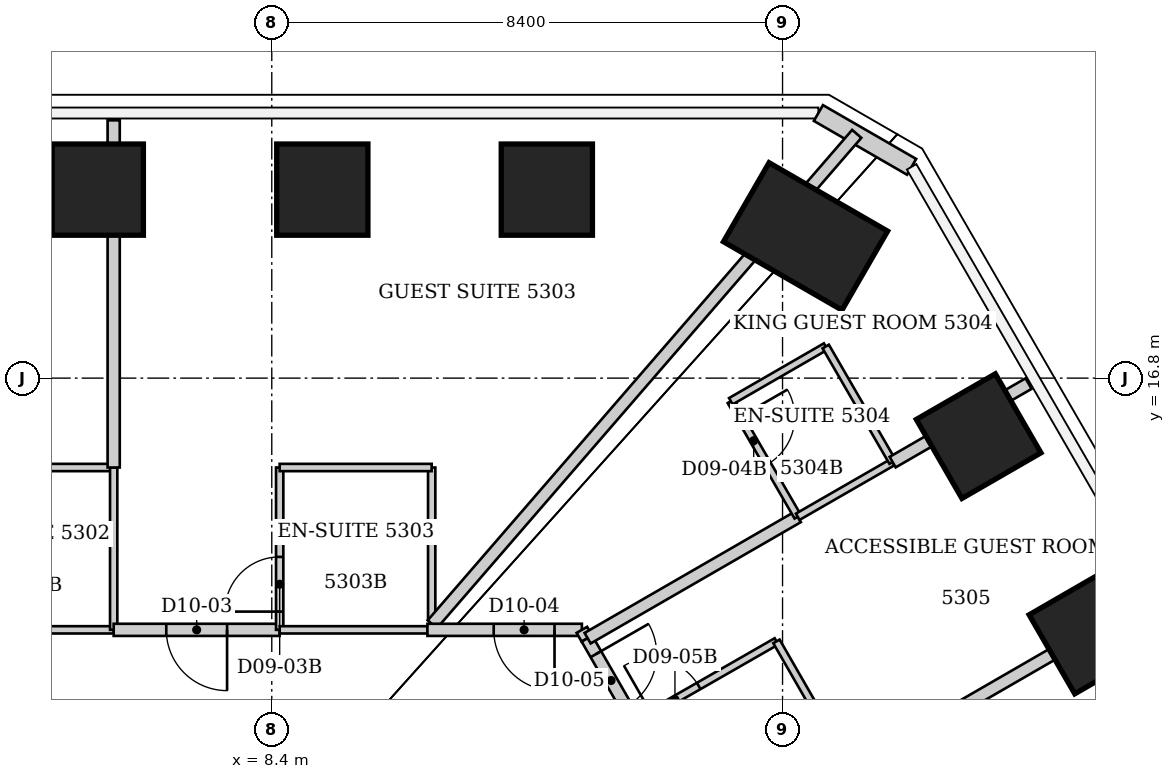
"""IFC4 building model, lengths in metres.
Left out: names, types, materials, properties, quantities, classifications, styles, units other than length and angle.
Written with IfcOpenShell. Run it as: python <this file> out.ifc"""

import sys

from ifc_helpers import new_model, si_unit, direction, frame, frame_2d, origin, origin_2d, place, context, subcontext, project, spatial, rectangle, extrude, element, fill, save


model = new_model("IFC4")
c1 = context("Model", 3, precision=1e-05, world=origin(), true_north=direction((0.0, 1.0)))
c2 = subcontext(c1, "Body", "Model", "MODEL_VIEW")
j1 = project(units=[si_unit("LENGTHUNIT", "METRE"), si_unit("PLANEANGLEUNIT", "RADIAN")], contexts=[c1])
p1 = place(None, origin())
s1 = spatial("IfcSite", under=j1, at=p1, CompositionType="ELEMENT")
p2 = place(p1, origin())
s2 = spatial("IfcBuilding", under=s1, at=p2, CompositionType="ELEMENT")
p3 = place(p2, frame((0.0, 0.0, 213.6)))
s3 = spatial("IfcBuildingStorey", under=s2, at=p3, CompositionType="ELEMENT", Elevation=213.6)
for number, where, z_axis, x_axis in (
    (1, (5.539, 19.9, 0.0), (0.0, 0.0, 1.0), (0.0, 1.0, 0.0)),
    (2, (9.231, 19.9, 0.0), (0.0, 0.0, 1.0), (0.0, 1.0, 0.0)),
    (3, (12.924, 19.9, 0.0), (0.0, 0.0, 1.0), (0.0, 1.0, 0.0)),
):
    element("IfcColumn", number, at=place(p3, frame(where, z_axis=z_axis, x_axis=x_axis)), inside=s3, PredefinedType="COLUMN", context=c2, shape_type="SweptSolid", body=[
        extrude(rectangle(XDim=1.5, YDim=1.5, at=origin_2d()), origin(), (0.0, 0.0, 1.0), 3.8),
    ])
p4 = place(p3, frame((17.178, 19.131, 0.0), z_axis=(0.0, 0.0, 1.0), x_axis=(0.5, 0.866025403784, 0.0)))
e4 = element("IfcColumn", 4, at=p4, inside=s3, PredefinedType="COLUMN", context=c2, shape_type="SweptSolid", body=[
    extrude(rectangle(XDim=1.5, YDim=2.25, at=origin_2d()), origin(), (0.0, 0.0, 1.0), 3.8),
])
for number, where, z_axis, x_axis in (
    (5, (20.025, 15.846, 0.0), (0.0, 0.0, 1.0), (0.866, 0.5, 0.0)),
    (6, (21.88, 12.633, 0.0), (0.0, 0.0, 1.0), (0.866, 0.5, 0.0)),
):
    element("IfcColumn", number, at=place(p3, frame(where, z_axis=z_axis, x_axis=x_axis)), inside=s3, PredefinedType="COLUMN", context=c2, shape_type="SweptSolid", body=[
        extrude(rectangle(XDim=1.5, YDim=1.5, at=origin_2d()), origin(), (0.0, 0.0, 1.0), 3.8),
    ])
p5 = place(p3, frame((17.39, 21.16, 0.0), z_axis=(0.0, 0.0, 1.0), x_axis=(0.866036293601, -0.499981137809, 0.0)))
e7 = element("IfcWall", 7, at=p5, inside=s3, PredefinedType="SOLIDWALL", context=c2, shape_type="SweptSolid", body=[
    extrude(rectangle(XDim=1.77, YDim=0.3, at=frame_2d((0.885, 0.0))), origin(), (0.0, 0.0, 1.0), 3.64),
])
for number, where, z_axis, x_axis in (
    (8, (5.8, 12.66, 0.0), (0.0, 0.0, 1.0), (-1.0, 0.0, 0.0)),
    (9, (5.8, 15.33, 0.0), (0.0, 0.0, 1.0), (-1.0, 0.0, 0.0)),
):
    element("IfcWall", number, at=place(p3, frame(where, z_axis=z_axis, x_axis=x_axis)), inside=s3, PredefinedType="PARTITIONING", context=c2, shape_type="SweptSolid", body=[
        extrude(rectangle(XDim=2.45, YDim=0.12, at=frame_2d((1.225, 0.0))), origin(), (0.0, 0.0, 1.0), 3.64),
    ])
p6 = place(p3, frame((5.8, 15.33, 0.0), z_axis=(0.0, 0.0, 1.0), x_axis=(0.0, -1.0, 0.0)))
e10 = element("IfcWall", 10, at=p6, inside=s3, PredefinedType="PARTITIONING", context=c2, shape_type="SweptSolid", body=[
    extrude(rectangle(XDim=2.67, YDim=0.12, at=frame_2d((1.335, 0.0))), origin(), (0.0, 0.0, 1.0), 3.64),
])
p7 = place(p3, frame((5.8, 21.04, 0.0), z_axis=(0.0, 0.0, 1.0), x_axis=(0.0, -1.0, 0.0)))
e11 = element("IfcWall", 11, at=p7, inside=s3, PredefinedType="PARTITIONING", context=c2, shape_type="SweptSolid", body=[
    extrude(rectangle(XDim=5.71, YDim=0.2, at=frame_2d((2.855, 0.0))), origin(), (0.0, 0.0, 1.0), 3.64),
])
p8 = place(p3, frame((8.53, 12.66, 0.0), z_axis=(0.0, 0.0, 1.0), x_axis=(-1.0, 0.0, 0.0)))
e12 = element("IfcWall", 12, at=p8, inside=s3, PredefinedType="PARTITIONING", context=c2, shape_type="SweptSolid", body=[
    extrude(rectangle(XDim=2.73, YDim=0.2, at=frame_2d((1.365, 0.0))), origin(), (0.0, 0.0, 1.0), 3.64),
])
p9 = place(p8, frame((0.865, 0.0, 0.0)))
e13 = element("IfcOpeningElement", 13, at=p9, cuts=e12, PredefinedType="OPENING", context=c2, shape_type="SweptSolid", body=[
    extrude(rectangle(XDim=1.0, YDim=2.13, at=frame_2d((0.5, 1.065))), frame((0.0, 0.1, 0.0), z_axis=(0.0, -1.0, 0.0), x_axis=(1.0, 0.0, 0.0)), (0.0, 0.0, 1.0), 0.2),
])
p10 = place(p3, frame((8.53, 15.33, 0.0), z_axis=(0.0, 0.0, 1.0), x_axis=(0.0, -1.0, 0.0)))
e14 = element("IfcWall", 14, at=p10, inside=s3, PredefinedType="PARTITIONING", context=c2, shape_type="SweptSolid", body=[
    extrude(rectangle(XDim=2.67, YDim=0.12, at=frame_2d((1.335, 0.0))), origin(), (0.0, 0.0, 1.0), 3.64),
])
p11 = place(p10, frame((1.47, 0.0, 0.0)))
e15 = element("IfcOpeningElement", 15, at=p11, cuts=e14, PredefinedType="OPENING", context=c2, shape_type="SweptSolid", body=[
    extrude(rectangle(XDim=0.9, YDim=2.03, at=frame_2d((0.45, 1.015))), frame((0.0, 0.06, 0.0), z_axis=(0.0, -1.0, 0.0), x_axis=(1.0, 0.0, 0.0)), (0.0, 0.0, 1.0), 0.12),
])
p12 = place(p3, frame((10.96, 12.66, 0.0), z_axis=(0.0, 0.0, 1.0), x_axis=(-1.0, 0.0, 0.0)))
e16 = element("IfcWall", 16, at=p12, inside=s3, PredefinedType="PARTITIONING", context=c2, shape_type="SweptSolid", body=[
    extrude(rectangle(XDim=2.43, YDim=0.12, at=frame_2d((1.215, 0.0))), origin(), (0.0, 0.0, 1.0), 3.64),
])
p13 = place(p3, frame((11.03, 12.83, 0.0), z_axis=(0.0, 0.0, 1.0), x_axis=(0.0, 1.0, 0.0)))
e17 = element("IfcWall", 17, at=p13, inside=s3, PredefinedType="PARTITIONING", context=c2, shape_type="SweptSolid", body=[
    extrude(rectangle(XDim=2.5, YDim=0.12, at=frame_2d((1.25, 0.0))), origin(), (0.0, 0.0, 1.0), 3.038),
])
p14 = place(p3, frame((11.03, 15.33, 0.0), z_axis=(0.0, 0.0, 1.0), x_axis=(-1.0, 0.0, 0.0)))
e18 = element("IfcWall", 18, at=p14, inside=s3, PredefinedType="PARTITIONING", context=c2, shape_type="SweptSolid", body=[
    extrude(rectangle(XDim=2.5, YDim=0.12, at=frame_2d((1.25, 0.0))), origin(), (0.0, 0.0, 1.0), 3.64),
])
p15 = place(p3, frame((11.04, 12.751, 0.0), z_axis=(0.0, 0.0, 1.0), x_axis=(0.654384042683, 0.756162366613, 0.0)))
e19 = element("IfcWall", 19, at=p15, inside=s3, PredefinedType="PARTITIONING", context=c2, shape_type="SweptSolid", body=[
    extrude(rectangle(XDim=10.667, YDim=0.2, at=frame_2d((5.333, 0.0))), origin(), (0.0, 0.0, 1.0), 3.64),
])
p16 = place(p3, frame((13.5, 12.66, 0.0), z_axis=(0.0, 0.0, 1.0), x_axis=(-1.0, 0.0, 0.0)))
e20 = element("IfcWall", 20, at=p16, inside=s3, PredefinedType="PARTITIONING", context=c2, shape_type="SweptSolid", body=[
    extrude(rectangle(XDim=2.54, YDim=0.2, at=frame_2d((1.27, 0.0))), origin(), (0.0, 0.0, 1.0), 3.64),
])
p17 = place(p16, frame((0.45, 0.0, 0.0)))
e21 = element("IfcOpeningElement", 21, at=p17, cuts=e20, PredefinedType="OPENING", context=c2, shape_type="SweptSolid", body=[
    extrude(rectangle(XDim=1.0, YDim=2.13, at=frame_2d((0.5, 1.065))), frame((0.0, 0.1, 0.0), z_axis=(0.0, -1.0, 0.0), x_axis=(1.0, 0.0, 0.0)), (0.0, 0.0, 1.0), 0.2),
])
p18 = place(p3, frame((13.5, 12.66, 0.0), z_axis=(0.0, 0.0, 1.0), x_axis=(0.498194987799, -0.867065023013, 0.0)))
e22 = element("IfcWall", 22, at=p18, inside=s3, PredefinedType="PARTITIONING", context=c2, shape_type="SweptSolid", body=[
    extrude(rectangle(XDim=0.166, YDim=0.2, at=frame_2d((0.083, 0.0))), origin(), (0.0, 0.0, 1.0), 3.64),
])
p19 = place(p3, frame((13.583, 12.516, 0.0), z_axis=(0.0, 0.0, 1.0), x_axis=(0.498534585837, -0.866869809559, 0.0)))
e23 = element("IfcWall", 23, at=p19, inside=s3, PredefinedType="PARTITIONING", context=c2, shape_type="SweptSolid", body=[
    extrude(rectangle(XDim=1.59, YDim=0.2, at=frame_2d((0.795, 0.0))), origin(), (0.0, 0.0, 1.0), 3.64),
])
p20 = place(p19, frame((0.295, 0.0, 0.0)))
e24 = element("IfcOpeningElement", 24, at=p20, cuts=e23, PredefinedType="OPENING", context=c2, shape_type="SweptSolid", body=[
    extrude(rectangle(XDim=1.0, YDim=2.13, at=frame_2d((0.5, 1.065))), frame((0.0, 0.1, 0.0), z_axis=(0.0, -1.0, 0.0), x_axis=(1.0, 0.0, 0.0)), (0.0, 0.0, 1.0), 0.2),
])
p21 = place(p3, frame((13.594, 12.522, 0.0), z_axis=(0.0, 0.0, 1.0), x_axis=(0.866085778049, 0.499895414124, 0.0)))
e25 = element("IfcWall", 25, at=p21, inside=s3, PredefinedType="PARTITIONING", context=c2, shape_type="SweptSolid", body=[
    extrude(rectangle(XDim=3.991, YDim=0.2, at=frame_2d((1.996, 0.0))), origin(), (0.0, 0.0, 1.0), 3.64),
])
p22 = place(p3, frame((15.95, 16.42, 0.0), z_axis=(0.0, 0.0, 1.0), x_axis=(0.501088872721, -0.865395829453, 0.0)))
e26 = element("IfcWall", 26, at=p22, inside=s3, PredefinedType="PARTITIONING", context=c2, shape_type="SweptSolid", body=[
    extrude(rectangle(XDim=2.195, YDim=0.12, at=frame_2d((1.098, 0.0))), origin(), (0.0, 0.0, 1.0), 3.64),
])
p23 = place(p22, frame((0.3, 0.0, 0.0)))
e27 = element("IfcOpeningElement", 27, at=p23, cuts=e26, PredefinedType="OPENING", context=c2, shape_type="SweptSolid", body=[
    extrude(rectangle(XDim=0.9, YDim=2.03, at=frame_2d((0.45, 1.015))), frame((0.0, 0.06, 0.0), z_axis=(0.0, -1.0, 0.0), x_axis=(1.0, 0.0, 0.0)), (0.0, 0.0, 1.0), 0.12),
])
p24 = place(p3, frame((16.7, 12.47, 0.0), z_axis=(0.0, 0.0, 1.0), x_axis=(-0.867545659855, -0.497357545501, 0.0)))
e28 = element("IfcWall", 28, at=p24, inside=s3, PredefinedType="PARTITIONING", context=c2, shape_type="SweptSolid", body=[
    extrude(rectangle(XDim=2.674, YDim=0.12, at=frame_2d((1.337, 0.0))), origin(), (0.0, 0.0, 1.0), 3.64),
])
p25 = place(p24, frame((1.474, 0.0, 0.0)))
e29 = element("IfcOpeningElement", 29, at=p25, cuts=e28, PredefinedType="OPENING", context=c2, shape_type="SweptSolid", body=[
    extrude(rectangle(XDim=0.9, YDim=2.03, at=frame_2d((0.45, 1.015))), frame((0.0, 0.06, 0.0), z_axis=(0.0, -1.0, 0.0), x_axis=(1.0, 0.0, 0.0)), (0.0, 0.0, 1.0), 0.12),
])
for number, where, z_axis, x_axis in (
    (30, (17.05, 14.52, 0.0), (0.0, 0.0, 1.0), (0.867, 0.499, 0.0)),
    (31, (17.51, 17.32, 0.0), (0.0, 0.0, 1.0), (-0.866, -0.5, 0.0)),
):
    element("IfcWall", number, at=place(p3, frame(where, z_axis=z_axis, x_axis=x_axis)), inside=s3, PredefinedType="PARTITIONING", context=c2, shape_type="SweptSolid", body=[
        extrude(rectangle(XDim=1.801, YDim=0.12, at=frame_2d((0.9, 0.0))), origin(), (0.0, 0.0, 1.0), 3.64),
    ])
p26 = place(p3, frame((17.92, 10.35, 0.0), z_axis=(0.0, 0.0, 1.0), x_axis=(-0.498791783817, 0.866721844883, 0.0)))
e32 = element("IfcWall", 32, at=p26, inside=s3, PredefinedType="PARTITIONING", context=c2, shape_type="SweptSolid", body=[
    extrude(rectangle(XDim=2.446, YDim=0.12, at=frame_2d((1.223, 0.0))), origin(), (0.0, 0.0, 1.0), 3.64),
])
p27 = place(p3, frame((17.923, 10.345, 0.0), z_axis=(0.0, 0.0, 1.0), x_axis=(0.865991848905, 0.500058114253, 0.0)))
e33 = element("IfcWall", 33, at=p27, inside=s3, PredefinedType="PARTITIONING", context=c2, shape_type="SweptSolid", body=[
    extrude(rectangle(XDim=5.708, YDim=0.2, at=frame_2d((2.854, 0.0))), origin(), (0.0, 0.0, 1.0), 2.878),
])
p28 = place(p3, frame((18.61, 15.42, 0.0), z_axis=(0.0, 0.0, 1.0), x_axis=(-0.501040653706, 0.865423747845, 0.0)))
e34 = element("IfcWall", 34, at=p28, inside=s3, PredefinedType="PARTITIONING", context=c2, shape_type="SweptSolid", body=[
    extrude(rectangle(XDim=2.196, YDim=0.12, at=frame_2d((1.098, 0.0))), origin(), (0.0, 0.0, 1.0), 3.64),
])
p29 = place(p3, frame((18.611, 15.418, 0.0), z_axis=(0.0, 0.0, 1.0), x_axis=(0.865870535136, 0.500268144481, 0.0)))
e35 = element("IfcWall", 35, at=p29, inside=s3, PredefinedType="PARTITIONING", context=c2, shape_type="SweptSolid", body=[
    extrude(rectangle(XDim=2.582, YDim=0.2, at=frame_2d((1.291, 0.0))), origin(), (0.0, 0.0, 1.0), 3.64),
])
p30 = place(p9, origin())
e36 = element("IfcDoor", 36, at=p30, inside=s3, OperationType="SINGLE_SWING_LEFT", PredefinedType="DOOR", context=c2, shape_type="SweptSolid", body=[
    extrude(rectangle(XDim=1.0, YDim=2.13, at=frame_2d((0.5, 1.065))), frame((0.0, 0.025, 0.0), z_axis=(0.0, -1.0, 0.0), x_axis=(1.0, 0.0, 0.0)), (0.0, 0.0, 1.0), 0.05),
])
fill(e13, e36)
p31 = place(p11, origin())
e37 = element("IfcDoor", 37, at=p31, inside=s3, OperationType="SINGLE_SWING_RIGHT", PredefinedType="DOOR", context=c2, shape_type="SweptSolid", body=[
    extrude(rectangle(XDim=0.9, YDim=2.03, at=frame_2d((0.45, 1.015))), frame((0.0, 0.025, 0.0), z_axis=(0.0, -1.0, 0.0), x_axis=(1.0, 0.0, 0.0)), (0.0, 0.0, 1.0), 0.05),
])
fill(e15, e37)
p32 = place(p17, origin())
e38 = element("IfcDoor", 38, at=p32, inside=s3, OperationType="SINGLE_SWING_LEFT", PredefinedType="DOOR", context=c2, shape_type="SweptSolid", body=[
    extrude(rectangle(XDim=1.0, YDim=2.13, at=frame_2d((0.5, 1.065))), frame((0.0, 0.025, 0.0), z_axis=(0.0, -1.0, 0.0), x_axis=(1.0, 0.0, 0.0)), (0.0, 0.0, 1.0), 0.05),
])
fill(e21, e38)
p33 = place(p23, origin())
e39 = element("IfcDoor", 39, at=p33, inside=s3, OperationType="SINGLE_SWING_LEFT", PredefinedType="DOOR", context=c2, shape_type="SweptSolid", body=[
    extrude(rectangle(XDim=0.9, YDim=2.03, at=frame_2d((0.45, 1.015))), frame((0.0, 0.025, 0.0), z_axis=(0.0, -1.0, 0.0), x_axis=(1.0, 0.0, 0.0)), (0.0, 0.0, 1.0), 0.05),
])
fill(e27, e39)
p34 = place(p20, origin())
e40 = element("IfcDoor", 40, at=p34, inside=s3, OperationType="SINGLE_SWING_LEFT", PredefinedType="DOOR", context=c2, shape_type="SweptSolid", body=[
    extrude(rectangle(XDim=1.0, YDim=2.13, at=frame_2d((0.5, 1.065))), frame((0.0, 0.025, 0.0), z_axis=(0.0, -1.0, 0.0), x_axis=(1.0, 0.0, 0.0)), (0.0, 0.0, 1.0), 0.05),
])
fill(e24, e40)
p35 = place(p25, origin())
e41 = element("IfcDoor", 41, at=p35, inside=s3, OperationType="SINGLE_SWING_RIGHT", PredefinedType="DOOR", context=c2, shape_type="SweptSolid", body=[
    extrude(rectangle(XDim=0.9, YDim=2.03, at=frame_2d((0.45, 1.015))), frame((0.0, 0.025, 0.0), z_axis=(0.0, -1.0, 0.0), x_axis=(1.0, 0.0, 0.0)), (0.0, 0.0, 1.0), 0.05),
])
fill(e29, e41)
save(model, sys.argv[1])
